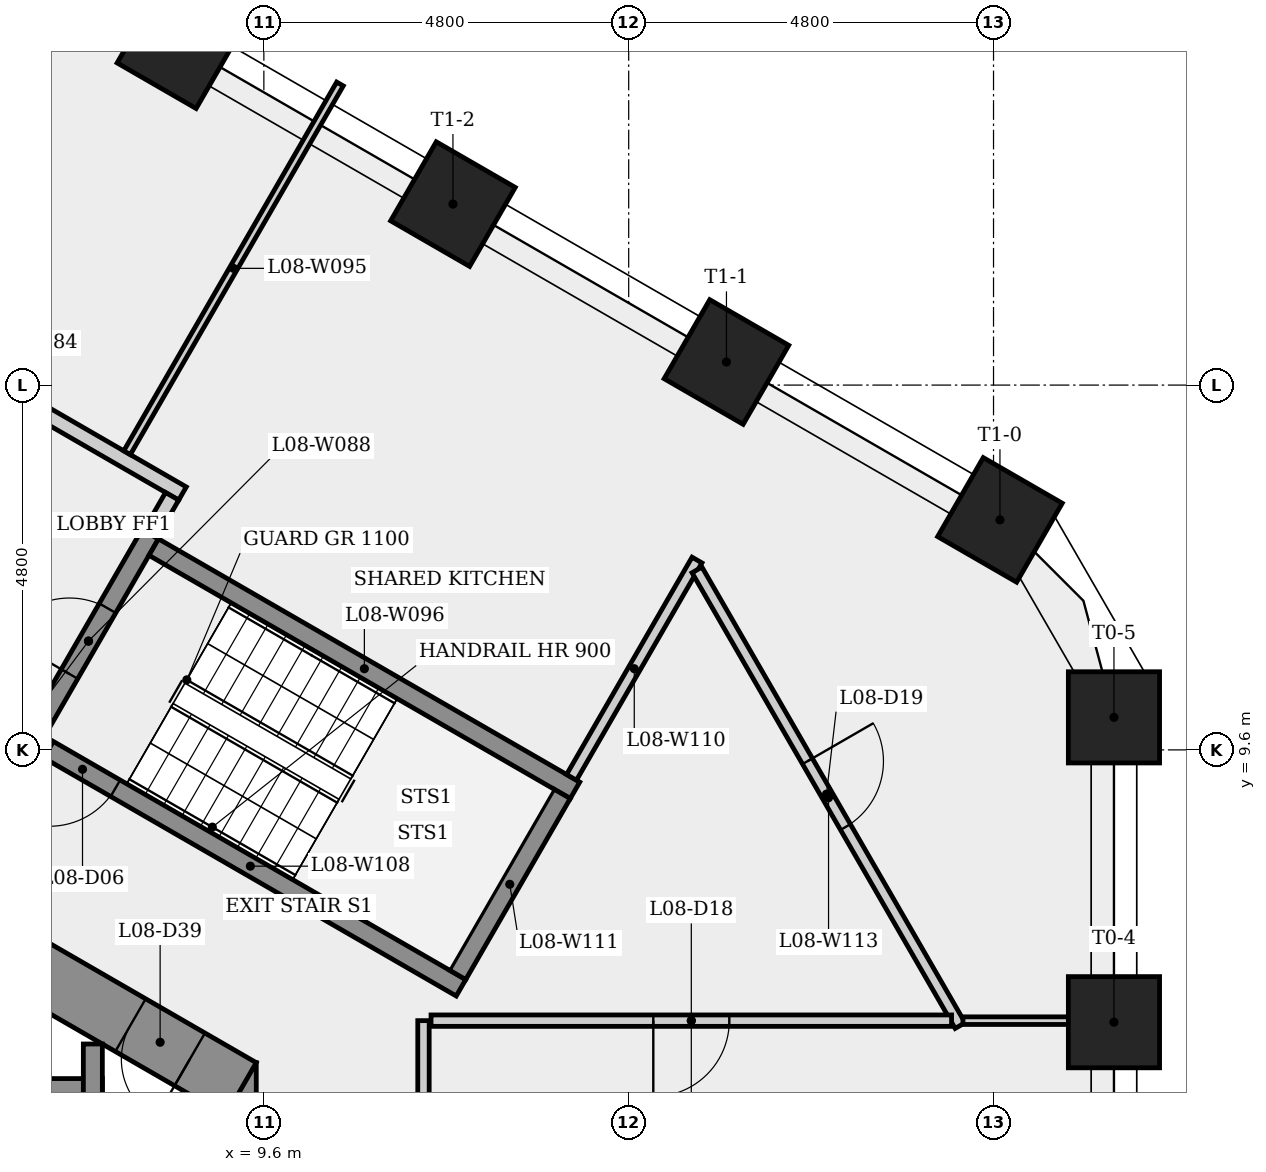
"""IFC4 building model, lengths in metres.
Left out: names, types, materials, properties, quantities, classifications, styles, units other than length and angle.
Written with IfcOpenShell. Run it as: python <this file> out.ifc"""

import sys

from ifc_helpers import new_model, si_unit, direction, frame, frame_2d, origin, origin_2d, place, context, subcontext, project, spatial, rectangle, extrude, element, fill, save


model = new_model("IFC4")
c1 = context("Model", 3, precision=1e-05, world=origin(), true_north=direction((0.0, 1.0)))
c2 = subcontext(c1, "Body", "Model", "MODEL_VIEW")
j1 = project(units=[si_unit("LENGTHUNIT", "METRE"), si_unit("PLANEANGLEUNIT", "RADIAN")], contexts=[c1])
p1 = place(None, origin())
s1 = spatial("IfcSite", under=j1, at=p1, CompositionType="ELEMENT")
p2 = place(p1, origin())
s2 = spatial("IfcBuilding", under=s1, at=p2, CompositionType="ELEMENT")
p3 = place(p2, frame((0.0, 0.0, 35.7)))
s3 = spatial("IfcBuildingStorey", under=s2, at=p3, CompositionType="ELEMENT", Elevation=35.7)
p4 = place(p3, frame((9.1, -5.485, 0.0), z_axis=(0.0, 0.0, 1.0), x_axis=(0.0, 1.0, 0.0)))
e1 = element("IfcWall", 1, at=p4, inside=s3, PredefinedType="SHEAR", context=c2, shape_type="SweptSolid", body=[
    extrude(rectangle(XDim=10.97, YDim=0.8, at=frame_2d((5.485, 0.0))), origin(), (0.0, 0.0, 1.0), 3.4),
])
p5 = place(p4, frame((4.685, 0.0, 0.0)))
e2 = element("IfcOpeningElement", 2, at=p5, cuts=e1, PredefinedType="OPENING", context=c2, shape_type="SweptSolid", body=[
    extrude(rectangle(XDim=1.6, YDim=2.1, at=frame_2d((0.8, 1.05))), frame((0.0, 0.41, 0.0), z_axis=(0.0, -1.0, 0.0), x_axis=(1.0, 0.0, 0.0)), (0.0, 0.0, 1.0), 0.82),
])
p6 = place(p3, frame((9.3, 5.138, 0.0), z_axis=(0.0, 0.0, 1.0), x_axis=(-0.866023993627, 0.500002442456, 0.0)))
e3 = element("IfcWall", 3, at=p6, inside=s3, PredefinedType="SHEAR", context=c2, shape_type="SweptSolid", body=[
    extrude(rectangle(XDim=10.97, YDim=0.8, at=frame_2d((5.485, 0.0))), origin(), (0.0, 0.0, 1.0), 3.4),
])
p7 = place(p6, frame((7.403, 0.0, 0.0)))
e4 = element("IfcOpeningElement", 4, at=p7, cuts=e3, PredefinedType="OPENING", context=c2, shape_type="SweptSolid", body=[
    extrude(rectangle(XDim=0.9, YDim=2.1, at=frame_2d((0.45, 1.05))), frame((0.0, 0.41, 0.0), z_axis=(0.0, -1.0, 0.0), x_axis=(1.0, 0.0, 0.0)), (0.0, 0.0, 1.0), 0.82),
])
p8 = place(p6, frame((0.78, 0.0, 0.0)))
e5 = element("IfcOpeningElement", 5, at=p8, cuts=e3, PredefinedType="OPENING", context=c2, shape_type="SweptSolid", body=[
    extrude(rectangle(XDim=0.9, YDim=2.1, at=frame_2d((0.45, 1.05))), frame((0.0, 0.41, 0.0), z_axis=(0.0, -1.0, 0.0), x_axis=(1.0, 0.0, 0.0)), (0.0, 0.0, 1.0), 0.82),
])
for number, where, z_axis, x_axis in (
    (6, (20.785, 6.017, 0.0), (0.0, 0.0, 1.0), (1.0, 0.0, 0.0)),
    (7, (20.785, 10.028, 0.0), (0.0, 0.0, 1.0), (1.0, 0.0, 0.0)),
    (8, (19.285, 12.626, 0.0), (0.0, 0.0, 1.0), (0.5, 0.866, 0.0)),
    (9, (15.686, 14.704, 0.0), (0.0, 0.0, 1.0), (0.5, 0.866, 0.0)),
    (10, (12.088, 16.781, 0.0), (0.0, 0.0, 1.0), (0.5, 0.866, 0.0)),
    (11, (8.489, 18.859, 0.0), (0.0, 0.0, 1.0), (0.5, 0.866, 0.0)),
):
    element("IfcColumn", number, at=place(p3, frame(where, z_axis=z_axis, x_axis=x_axis)), inside=s3, PredefinedType="COLUMN", context=c2, shape_type="SweptSolid", body=[
        extrude(rectangle(XDim=1.2, YDim=1.2, at=origin_2d()), origin(), (0.0, 0.0, 1.0), 3.4),
    ])
p9 = place(p3, frame((-7.225, 5.15, 0.0), z_axis=(0.0, 0.0, 1.0), x_axis=(1.0, 0.0, 0.0)))
e12 = element("IfcWall", 12, at=p9, inside=s3, PredefinedType="SHEAR", context=c2, shape_type="SweptSolid", body=[
    extrude(rectangle(XDim=14.7, YDim=0.25, at=frame_2d((7.35, 0.0))), origin(), (0.0, 0.0, 1.0), 3.05),
])
p10 = place(p3, frame((4.459, 15.323, 0.0), z_axis=(0.0, 0.0, 1.0), x_axis=(0.866016039709, -0.500016218704, 0.0)))
e13 = element("IfcWall", 13, at=p10, inside=s3, PredefinedType="PARTITIONING", context=c2, shape_type="SweptSolid", body=[
    extrude(rectangle(XDim=4.7, YDim=0.2, at=frame_2d((2.35, 0.0))), origin(), (0.0, 0.0, 1.0), 3.05),
])
p11 = place(p3, frame((6.48, 9.624, 0.0), z_axis=(0.0, 0.0, 1.0), x_axis=(0.500017246033, 0.866015446554, 0.0)))
e14 = element("IfcWall", 14, at=p11, inside=s3, PredefinedType="SHEAR", context=c2, shape_type="SweptSolid", body=[
    extrude(rectangle(XDim=3.25, YDim=0.25, at=frame_2d((1.625, 0.0))), origin(), (0.0, 0.0, 1.0), 3.05),
])
p12 = place(p11, frame((1.125, 0.0, 0.0)))
e15 = element("IfcOpeningElement", 15, at=p12, cuts=e14, PredefinedType="OPENING", context=c2, shape_type="SweptSolid", body=[
    extrude(rectangle(XDim=1.0, YDim=2.1, at=frame_2d((0.5, 1.05))), frame((0.0, 0.135, 0.0), z_axis=(0.0, -1.0, 0.0), x_axis=(1.0, 0.0, 0.0)), (0.0, 0.0, 1.0), 0.27),
])
p13 = place(p3, frame((7.35, 5.73, 0.0), z_axis=(0.0, 0.0, 1.0), x_axis=(0.0, -1.0, 0.0)))
e16 = element("IfcWall", 16, at=p13, inside=s3, PredefinedType="SHEAR", context=c2, shape_type="SweptSolid", body=[
    extrude(rectangle(XDim=3.805, YDim=0.25, at=frame_2d((1.903, 0.0))), origin(), (0.0, 0.0, 1.0), 3.05),
])
p14 = place(p3, frame((7.8, 13.51, 0.0), z_axis=(0.0, 0.0, 1.0), x_axis=(0.499991527163, 0.866030295524, 0.0)))
e17 = element("IfcWall", 17, at=p14, inside=s3, PredefinedType="PARTITIONING", context=c2, shape_type="SweptSolid", body=[
    extrude(rectangle(XDim=5.603, YDim=0.1, at=frame_2d((2.801, 0.0))), origin(), (0.0, 0.0, 1.0), 3.05),
])
p15 = place(p3, frame((8.151, 12.268, 0.0), z_axis=(0.0, 0.0, 1.0), x_axis=(0.866025499775, -0.499999833739, 0.0)))
e18 = element("IfcWall", 18, at=p15, inside=s3, PredefinedType="SHEAR", context=c2, shape_type="SweptSolid", body=[
    extrude(rectangle(XDim=6.4, YDim=0.25, at=frame_2d((3.2, 0.0))), origin(), (0.0, 0.0, 1.0), 3.05),
])
p16 = place(p3, frame((8.393, 12.937, 0.0), z_axis=(0.0, 0.0, 1.0), x_axis=(-0.500065409566, -0.86598763626, 0.0)))
e19 = element("IfcWall", 19, at=p16, inside=s3, PredefinedType="PARTITIONING", context=c2, shape_type="SweptSolid", body=[
    extrude(rectangle(XDim=0.575, YDim=0.2, at=frame_2d((0.288, 0.0))), origin(), (0.0, 0.0, 1.0), 3.05),
])
p17 = place(p3, frame((11.7, -5.962, 0.0), z_axis=(0.0, 0.0, 1.0), x_axis=(0.0, 1.0, 0.0)))
e20 = element("IfcWall", 20, at=p17, inside=s3, PredefinedType="PARTITIONING", context=c2, shape_type="SweptSolid", body=[
    extrude(rectangle(XDim=12.0, YDim=0.15, at=frame_2d((6.0, 0.0))), origin(), (0.0, 0.0, 1.0), 3.05),
])
p18 = place(p17, frame((2.949, 0.0, 0.0)))
e21 = element("IfcOpeningElement", 21, at=p18, cuts=e20, PredefinedType="OPENING", context=c2, shape_type="SweptSolid", body=[
    extrude(rectangle(XDim=1.0, YDim=2.1, at=frame_2d((0.5, 1.05))), frame((0.0, 0.085, 0.0), z_axis=(0.0, -1.0, 0.0), x_axis=(1.0, 0.0, 0.0)), (0.0, 0.0, 1.0), 0.17),
])
p19 = place(p3, frame((12.194, 6.47, 0.0), z_axis=(0.0, 0.0, 1.0), x_axis=(-0.866025499775, 0.499999833739, 0.0)))
e22 = element("IfcWall", 22, at=p19, inside=s3, PredefinedType="SHEAR", context=c2, shape_type="SweptSolid", body=[
    extrude(rectangle(XDim=6.4, YDim=0.25, at=frame_2d((3.2, 0.0))), origin(), (0.0, 0.0, 1.0), 3.05),
])
p20 = place(p19, frame((5.25, 0.0, 0.0)))
e23 = element("IfcOpeningElement", 23, at=p20, cuts=e22, PredefinedType="OPENING", context=c2, shape_type="SweptSolid", body=[
    extrude(rectangle(XDim=1.0, YDim=2.1, at=frame_2d((0.5, 1.05))), frame((0.0, 0.135, 0.0), z_axis=(0.0, -1.0, 0.0), x_axis=(1.0, 0.0, 0.0)), (0.0, 0.0, 1.0), 0.27),
])
p21 = place(p3, frame((13.648, 9.239, 0.0), z_axis=(0.0, 0.0, 1.0), x_axis=(0.500004084281, 0.866023045711, 0.0)))
e24 = element("IfcWall", 24, at=p21, inside=s3, PredefinedType="PARTITIONING", context=c2, shape_type="SweptSolid", body=[
    extrude(rectangle(XDim=3.302, YDim=0.15, at=frame_2d((1.651, 0.0))), origin(), (0.0, 0.0, 1.0), 3.05),
])
p22 = place(p3, frame((13.523, 9.022, 0.0), z_axis=(0.0, 0.0, 1.0), x_axis=(-0.500034990121, -0.866005201286, 0.0)))
e25 = element("IfcWall", 25, at=p22, inside=s3, PredefinedType="SHEAR", context=c2, shape_type="SweptSolid", body=[
    extrude(rectangle(XDim=2.75, YDim=0.25, at=frame_2d((1.375, 0.0))), origin(), (0.0, 0.0, 1.0), 3.05),
])
p23 = place(p3, frame((15.299, 11.968, 0.0), z_axis=(0.0, 0.0, 1.0), x_axis=(0.499996158224, -0.866027621823, 0.0)))
e26 = element("IfcWall", 26, at=p23, inside=s3, PredefinedType="PARTITIONING", context=c2, shape_type="SweptSolid", body=[
    extrude(rectangle(XDim=6.923, YDim=0.15, at=frame_2d((3.462, 0.0))), origin(), (0.0, 0.0, 1.0), 3.05),
])
p24 = place(p23, frame((2.907, 0.0, 0.0)))
e27 = element("IfcOpeningElement", 27, at=p24, cuts=e26, PredefinedType="OPENING", context=c2, shape_type="SweptSolid", body=[
    extrude(rectangle(XDim=1.0, YDim=2.1, at=frame_2d((0.5, 1.05))), frame((0.0, 0.085, 0.0), z_axis=(0.0, -1.0, 0.0), x_axis=(1.0, 0.0, 0.0)), (0.0, 0.0, 1.0), 0.17),
])
p25 = place(p3, frame((18.798, 6.037, 0.0), z_axis=(0.0, 0.0, 1.0), x_axis=(1.0, 0.0, 0.0)))
e28 = element("IfcWall", 28, at=p25, inside=s3, PredefinedType="PARTITIONING", context=c2, shape_type="SweptSolid", body=[
    extrude(rectangle(XDim=1.987, YDim=0.1, at=frame_2d((0.994, 0.0))), origin(), (0.0, 0.0, 1.0), 3.05),
])
p26 = place(p3, frame((18.648, 6.037, 0.0), z_axis=(0.0, 0.0, 1.0), x_axis=(-1.0, 0.0, 0.0)))
e29 = element("IfcWall", 29, at=p26, inside=s3, PredefinedType="PARTITIONING", context=c2, shape_type="SweptSolid", body=[
    extrude(rectangle(XDim=6.848, YDim=0.15, at=frame_2d((3.424, 0.0))), origin(), (0.0, 0.0, 1.0), 3.05),
])
p27 = place(p26, frame((2.924, 0.0, 0.0)))
e30 = element("IfcOpeningElement", 30, at=p27, cuts=e29, PredefinedType="OPENING", context=c2, shape_type="SweptSolid", body=[
    extrude(rectangle(XDim=1.0, YDim=2.1, at=frame_2d((0.5, 1.05))), frame((0.0, 0.085, 0.0), z_axis=(0.0, -1.0, 0.0), x_axis=(1.0, 0.0, 0.0)), (0.0, 0.0, 1.0), 0.17),
])
p28 = place(p20, origin())
e31 = element("IfcDoor", 31, at=p28, inside=s3, OperationType="SINGLE_SWING_RIGHT", PredefinedType="DOOR", context=c2, shape_type="SweptSolid", body=[
    extrude(rectangle(XDim=1.0, YDim=2.1, at=frame_2d((0.5, 1.05))), frame((0.0, 0.025, 0.0), z_axis=(0.0, -1.0, 0.0), x_axis=(1.0, 0.0, 0.0)), (0.0, 0.0, 1.0), 0.05),
])
fill(e23, e31)
p29 = place(p12, origin())
e32 = element("IfcDoor", 32, at=p29, inside=s3, OperationType="SINGLE_SWING_LEFT", PredefinedType="DOOR", context=c2, shape_type="SweptSolid", body=[
    extrude(rectangle(XDim=1.0, YDim=2.1, at=frame_2d((0.5, 1.05))), frame((0.0, 0.025, 0.0), z_axis=(0.0, -1.0, 0.0), x_axis=(1.0, 0.0, 0.0)), (0.0, 0.0, 1.0), 0.05),
])
fill(e15, e32)
p30 = place(p27, origin())
e33 = element("IfcDoor", 33, at=p30, inside=s3, OperationType="SINGLE_SWING_RIGHT", PredefinedType="DOOR", context=c2, shape_type="SweptSolid", body=[
    extrude(rectangle(XDim=1.0, YDim=2.1, at=frame_2d((0.5, 1.05))), frame((0.0, 0.025, 0.0), z_axis=(0.0, -1.0, 0.0), x_axis=(1.0, 0.0, 0.0)), (0.0, 0.0, 1.0), 0.05),
])
fill(e30, e33)
p31 = place(p24, origin())
e34 = element("IfcDoor", 34, at=p31, inside=s3, OperationType="SINGLE_SWING_LEFT", PredefinedType="DOOR", context=c2, shape_type="SweptSolid", body=[
    extrude(rectangle(XDim=1.0, YDim=2.1, at=frame_2d((0.5, 1.05))), frame((0.0, 0.025, 0.0), z_axis=(0.0, -1.0, 0.0), x_axis=(1.0, 0.0, 0.0)), (0.0, 0.0, 1.0), 0.05),
])
fill(e27, e34)
p32 = place(p8, origin())
e35 = element("IfcDoor", 35, at=p32, inside=s3, OperationType="SINGLE_SWING_LEFT", PredefinedType="DOOR", context=c2, shape_type="SweptSolid", body=[
    extrude(rectangle(XDim=0.9, YDim=2.1, at=frame_2d((0.45, 1.05))), frame((0.0, 0.025, 0.0), z_axis=(0.0, -1.0, 0.0), x_axis=(1.0, 0.0, 0.0)), (0.0, 0.0, 1.0), 0.05),
])
fill(e5, e35)
save(model, sys.argv[1])
